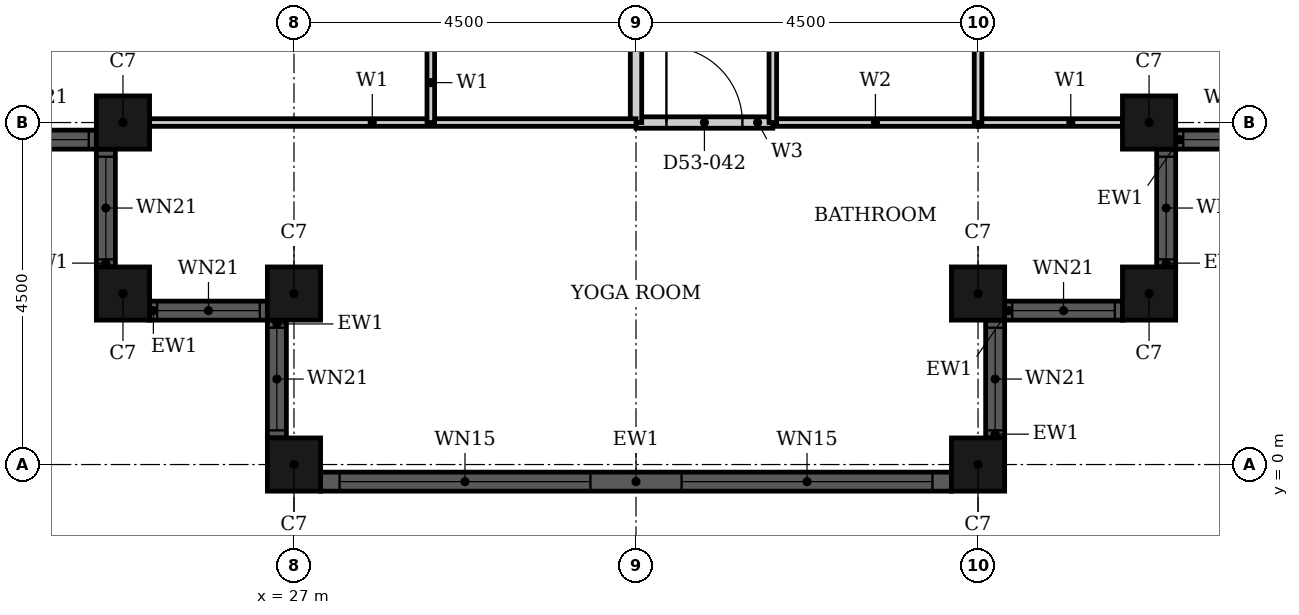
"""IFC4 building model, lengths in metres.
Left out: names, types, materials, properties, quantities, classifications, styles, units other than length and angle.
Written with IfcOpenShell. Run it as: python <this file> out.ifc"""

import sys

from ifc_helpers import new_model, si_unit, direction, frame, frame_2d, origin, origin_2d, place, context, subcontext, project, spatial, rectangle, hollow_rectangle, extrude, element, fill, save


model = new_model("IFC4")
c1 = context("Model", 3, precision=1e-05, world=origin(), true_north=direction((0.0, 1.0)))
c2 = subcontext(c1, "Body", "Model", "MODEL_VIEW")
j1 = project(units=[si_unit("LENGTHUNIT", "METRE"), si_unit("PLANEANGLEUNIT", "RADIAN")], contexts=[c1])
p1 = place(None, origin())
s1 = spatial("IfcSite", under=j1, at=p1, CompositionType="ELEMENT")
p2 = place(p1, origin())
s2 = spatial("IfcBuilding", under=s1, at=p2, CompositionType="ELEMENT")
p3 = place(p2, frame((0.0, 0.0, 210.9)))
s3 = spatial("IfcBuildingStorey", under=s2, at=p3, CompositionType="ELEMENT", Elevation=210.9)
for number, where, z_axis, x_axis in (
    (1, (24.75, 4.5, 0.0), (0.0, 0.0, 1.0), (1.0, 0.0, 0.0)),
    (2, (24.75, 2.25, 0.0), (0.0, 0.0, 1.0), (1.0, 0.0, 0.0)),
    (3, (27.0, 2.25, 0.0), (0.0, 0.0, 1.0), (1.0, 0.0, 0.0)),
    (4, (27.0, 0.0, 0.0), (0.0, 0.0, 1.0), (1.0, 0.0, 0.0)),
    (5, (36.0, 0.0, 0.0), (0.0, 0.0, 1.0), (1.0, 0.0, 0.0)),
    (6, (36.0, 2.25, 0.0), (0.0, 0.0, 1.0), (1.0, 0.0, 0.0)),
    (7, (38.25, 2.25, 0.0), (0.0, 0.0, 1.0), (1.0, 0.0, 0.0)),
    (8, (38.25, 4.5, 0.0), (0.0, 0.0, 1.0), (1.0, 0.0, 0.0)),
):
    element("IfcColumn", number, at=place(p3, frame(where, z_axis=z_axis, x_axis=x_axis)), inside=s3, PredefinedType="COLUMN", context=c2, shape_type="SweptSolid", body=[
        extrude(hollow_rectangle(XDim=0.7, YDim=0.7, WallThickness=0.022, at=origin_2d()), origin(), (0.0, 0.0, 1.0), 3.7),
    ])
p4 = place(p3, frame((22.85, 4.275, 0.0), z_axis=(0.0, 0.0, 1.0), x_axis=(1.0, 0.0, 0.0)))
e9 = element("IfcWall", 9, at=p4, inside=s3, PredefinedType="SOLIDWALL", context=c2, shape_type="SweptSolid", body=[
    extrude(rectangle(XDim=1.55, YDim=0.25, at=frame_2d((0.775, 0.0))), origin(), (0.0, 0.0, 1.0), 3.7),
])
p5 = place(p4, frame((0.1, 0.0, 0.9)))
e10 = element("IfcOpeningElement", 10, at=p5, cuts=e9, PredefinedType="OPENING", context=c2, shape_type="SweptSolid", body=[
    extrude(rectangle(XDim=1.35, YDim=1.85, at=frame_2d((0.675, 0.925))), frame((0.0, 0.135, 0.0), z_axis=(0.0, -1.0, 0.0), x_axis=(1.0, 0.0, 0.0)), (0.0, 0.0, 1.0), 0.27),
])
p6 = place(p3, frame((24.525, 4.15, 0.0), z_axis=(0.0, 0.0, 1.0), x_axis=(0.0, -1.0, 0.0)))
e11 = element("IfcWall", 11, at=p6, inside=s3, PredefinedType="SOLIDWALL", context=c2, shape_type="SweptSolid", body=[
    extrude(rectangle(XDim=1.55, YDim=0.25, at=frame_2d((0.775, 0.0))), origin(), (0.0, 0.0, 1.0), 3.7),
])
p7 = place(p6, frame((0.1, 0.0, 0.9)))
e12 = element("IfcOpeningElement", 12, at=p7, cuts=e11, PredefinedType="OPENING", context=c2, shape_type="SweptSolid", body=[
    extrude(rectangle(XDim=1.35, YDim=1.85, at=frame_2d((0.675, 0.925))), frame((0.0, 0.135, 0.0), z_axis=(0.0, -1.0, 0.0), x_axis=(1.0, 0.0, 0.0)), (0.0, 0.0, 1.0), 0.27),
])
p8 = place(p3, frame((25.1, 2.025, 0.0), z_axis=(0.0, 0.0, 1.0), x_axis=(1.0, 0.0, 0.0)))
e13 = element("IfcWall", 13, at=p8, inside=s3, PredefinedType="SOLIDWALL", context=c2, shape_type="SweptSolid", body=[
    extrude(rectangle(XDim=1.55, YDim=0.25, at=frame_2d((0.775, 0.0))), origin(), (0.0, 0.0, 1.0), 3.7),
])
p9 = place(p8, frame((0.1, 0.0, 0.9)))
e14 = element("IfcOpeningElement", 14, at=p9, cuts=e13, PredefinedType="OPENING", context=c2, shape_type="SweptSolid", body=[
    extrude(rectangle(XDim=1.35, YDim=1.85, at=frame_2d((0.675, 0.925))), frame((0.0, 0.135, 0.0), z_axis=(0.0, -1.0, 0.0), x_axis=(1.0, 0.0, 0.0)), (0.0, 0.0, 1.0), 0.27),
])
p10 = place(p3, frame((26.775, 1.9, 0.0), z_axis=(0.0, 0.0, 1.0), x_axis=(0.0, -1.0, 0.0)))
e15 = element("IfcWall", 15, at=p10, inside=s3, PredefinedType="SOLIDWALL", context=c2, shape_type="SweptSolid", body=[
    extrude(rectangle(XDim=1.55, YDim=0.25, at=frame_2d((0.775, 0.0))), origin(), (0.0, 0.0, 1.0), 3.7),
])
p11 = place(p10, frame((0.1, 0.0, 0.9)))
e16 = element("IfcOpeningElement", 16, at=p11, cuts=e15, PredefinedType="OPENING", context=c2, shape_type="SweptSolid", body=[
    extrude(rectangle(XDim=1.35, YDim=1.85, at=frame_2d((0.675, 0.925))), frame((0.0, 0.135, 0.0), z_axis=(0.0, -1.0, 0.0), x_axis=(1.0, 0.0, 0.0)), (0.0, 0.0, 1.0), 0.27),
])
p12 = place(p3, frame((27.35, -0.225, 0.0), z_axis=(0.0, 0.0, 1.0), x_axis=(1.0, 0.0, 0.0)))
e17 = element("IfcWall", 17, at=p12, inside=s3, PredefinedType="SOLIDWALL", context=c2, shape_type="SweptSolid", body=[
    extrude(rectangle(XDim=8.3, YDim=0.25, at=frame_2d((4.15, 0.0))), origin(), (0.0, 0.0, 1.0), 3.7),
])
p13 = place(p12, frame((0.25, 0.0, 0.45)))
e18 = element("IfcOpeningElement", 18, at=p13, cuts=e17, PredefinedType="OPENING", context=c2, shape_type="SweptSolid", body=[
    extrude(rectangle(XDim=3.3, YDim=2.3, at=frame_2d((1.65, 1.15))), frame((0.0, 0.135, 0.0), z_axis=(0.0, -1.0, 0.0), x_axis=(1.0, 0.0, 0.0)), (0.0, 0.0, 1.0), 0.27),
])
p14 = place(p12, frame((4.75, 0.0, 0.45)))
e19 = element("IfcOpeningElement", 19, at=p14, cuts=e17, PredefinedType="OPENING", context=c2, shape_type="SweptSolid", body=[
    extrude(rectangle(XDim=3.3, YDim=2.3, at=frame_2d((1.65, 1.15))), frame((0.0, 0.135, 0.0), z_axis=(0.0, -1.0, 0.0), x_axis=(1.0, 0.0, 0.0)), (0.0, 0.0, 1.0), 0.27),
])
p15 = place(p3, frame((36.225, 0.35, 0.0), z_axis=(0.0, 0.0, 1.0), x_axis=(0.0, 1.0, 0.0)))
e20 = element("IfcWall", 20, at=p15, inside=s3, PredefinedType="SOLIDWALL", context=c2, shape_type="SweptSolid", body=[
    extrude(rectangle(XDim=1.55, YDim=0.25, at=frame_2d((0.775, 0.0))), origin(), (0.0, 0.0, 1.0), 3.7),
])
p16 = place(p15, frame((0.1, 0.0, 0.9)))
e21 = element("IfcOpeningElement", 21, at=p16, cuts=e20, PredefinedType="OPENING", context=c2, shape_type="SweptSolid", body=[
    extrude(rectangle(XDim=1.35, YDim=1.85, at=frame_2d((0.675, 0.925))), frame((0.0, 0.135, 0.0), z_axis=(0.0, -1.0, 0.0), x_axis=(1.0, 0.0, 0.0)), (0.0, 0.0, 1.0), 0.27),
])
p17 = place(p3, frame((36.35, 2.025, 0.0), z_axis=(0.0, 0.0, 1.0), x_axis=(1.0, 0.0, 0.0)))
e22 = element("IfcWall", 22, at=p17, inside=s3, PredefinedType="SOLIDWALL", context=c2, shape_type="SweptSolid", body=[
    extrude(rectangle(XDim=1.55, YDim=0.25, at=frame_2d((0.775, 0.0))), origin(), (0.0, 0.0, 1.0), 3.7),
])
p18 = place(p17, frame((0.1, 0.0, 0.9)))
e23 = element("IfcOpeningElement", 23, at=p18, cuts=e22, PredefinedType="OPENING", context=c2, shape_type="SweptSolid", body=[
    extrude(rectangle(XDim=1.35, YDim=1.85, at=frame_2d((0.675, 0.925))), frame((0.0, 0.135, 0.0), z_axis=(0.0, -1.0, 0.0), x_axis=(1.0, 0.0, 0.0)), (0.0, 0.0, 1.0), 0.27),
])
p19 = place(p3, frame((38.475, 2.6, 0.0), z_axis=(0.0, 0.0, 1.0), x_axis=(0.0, 1.0, 0.0)))
e24 = element("IfcWall", 24, at=p19, inside=s3, PredefinedType="SOLIDWALL", context=c2, shape_type="SweptSolid", body=[
    extrude(rectangle(XDim=1.55, YDim=0.25, at=frame_2d((0.775, 0.0))), origin(), (0.0, 0.0, 1.0), 3.7),
])
p20 = place(p19, frame((0.1, 0.0, 0.9)))
e25 = element("IfcOpeningElement", 25, at=p20, cuts=e24, PredefinedType="OPENING", context=c2, shape_type="SweptSolid", body=[
    extrude(rectangle(XDim=1.35, YDim=1.85, at=frame_2d((0.675, 0.925))), frame((0.0, 0.135, 0.0), z_axis=(0.0, -1.0, 0.0), x_axis=(1.0, 0.0, 0.0)), (0.0, 0.0, 1.0), 0.27),
])
p21 = place(p3, frame((38.6, 4.275, 0.0), z_axis=(0.0, 0.0, 1.0), x_axis=(1.0, 0.0, 0.0)))
e26 = element("IfcWall", 26, at=p21, inside=s3, PredefinedType="SOLIDWALL", context=c2, shape_type="SweptSolid", body=[
    extrude(rectangle(XDim=1.55, YDim=0.25, at=frame_2d((0.775, 0.0))), origin(), (0.0, 0.0, 1.0), 3.7),
])
p22 = place(p21, frame((0.1, 0.0, 0.9)))
e27 = element("IfcOpeningElement", 27, at=p22, cuts=e26, PredefinedType="OPENING", context=c2, shape_type="SweptSolid", body=[
    extrude(rectangle(XDim=1.35, YDim=1.85, at=frame_2d((0.675, 0.925))), frame((0.0, 0.135, 0.0), z_axis=(0.0, -1.0, 0.0), x_axis=(1.0, 0.0, 0.0)), (0.0, 0.0, 1.0), 0.27),
])
p23 = place(p3, frame((31.5, 4.5, 0.0), z_axis=(0.0, 0.0, 1.0), x_axis=(1.0, 0.0, 0.0)))
e28 = element("IfcWall", 28, at=p23, inside=s3, PredefinedType="PARTITIONING", context=c2, shape_type="SweptSolid", body=[
    extrude(rectangle(XDim=1.8, YDim=0.15, at=frame_2d((0.9, 0.0))), origin(), (0.0, 0.0, 1.0), 3.4),
])
p24 = place(p23, frame((0.4, 0.0, 0.0)))
e29 = element("IfcOpeningElement", 29, at=p24, cuts=e28, PredefinedType="OPENING", context=c2, shape_type="SweptSolid", body=[
    extrude(rectangle(XDim=1.0, YDim=2.1, at=frame_2d((0.5, 1.05))), frame((0.0, 0.085, 0.0), z_axis=(0.0, -1.0, 0.0), x_axis=(1.0, 0.0, 0.0)), (0.0, 0.0, 1.0), 0.17),
])
p25 = place(p3, frame((31.5, 4.5, 0.0), z_axis=(0.0, 0.0, 1.0), x_axis=(0.0, 1.0, 0.0)))
e30 = element("IfcWall", 30, at=p25, inside=s3, PredefinedType="PARTITIONING", context=c2, shape_type="SweptSolid", body=[
    extrude(rectangle(XDim=6.6, YDim=0.15, at=frame_2d((3.3, 0.0))), origin(), (0.0, 0.0, 1.0), 2.68),
])
p26 = place(p25, frame((4.3, 0.0, 0.0)))
e31 = element("IfcOpeningElement", 31, at=p26, cuts=e30, PredefinedType="OPENING", context=c2, shape_type="SweptSolid", body=[
    extrude(rectangle(XDim=1.0, YDim=2.2, at=frame_2d((0.5, 1.1))), frame((0.0, 0.085, 0.0), z_axis=(0.0, -1.0, 0.0), x_axis=(1.0, 0.0, 0.0)), (0.0, 0.0, 1.0), 0.17),
])
p27 = place(p3, frame((36.0, 4.5, 0.0), z_axis=(0.0, 0.0, 1.0), x_axis=(1.0, 0.0, 0.0)))
e32 = element("IfcWall", 32, at=p27, inside=s3, PredefinedType="PARTITIONING", context=c2, shape_type="SweptSolid", body=[
    extrude(rectangle(XDim=2.44, YDim=0.1, at=frame_2d((1.22, 0.0))), origin(), (0.0, 0.0, 1.0), 3.4),
])
p28 = place(p3, frame((24.56, 4.5, 0.0), z_axis=(0.0, 0.0, 1.0), x_axis=(1.0, 0.0, 0.0)))
e33 = element("IfcWall", 33, at=p28, inside=s3, PredefinedType="PARTITIONING", context=c2, shape_type="SweptSolid", body=[
    extrude(rectangle(XDim=6.94, YDim=0.1, at=frame_2d((3.47, 0.0))), origin(), (0.0, 0.0, 1.0), 3.4),
])
p29 = place(p3, frame((28.8, 4.5, 0.0), z_axis=(0.0, 0.0, 1.0), x_axis=(0.0, 1.0, 0.0)))
e34 = element("IfcWall", 34, at=p29, inside=s3, PredefinedType="PARTITIONING", context=c2, shape_type="SweptSolid", body=[
    extrude(rectangle(XDim=3.0, YDim=0.1, at=frame_2d((1.5, 0.0))), origin(), (0.0, 0.0, 1.0), 3.4),
])
p30 = place(p29, frame((1.05, 0.0, 0.0)))
e35 = element("IfcOpeningElement", 35, at=p30, cuts=e34, PredefinedType="OPENING", context=c2, shape_type="SweptSolid", body=[
    extrude(rectangle(XDim=0.9, YDim=2.1, at=frame_2d((0.45, 1.05))), frame((0.0, 0.06, 0.0), z_axis=(0.0, -1.0, 0.0), x_axis=(1.0, 0.0, 0.0)), (0.0, 0.0, 1.0), 0.12),
])
p31 = place(p3, frame((33.3, 4.5, 0.0), z_axis=(0.0, 0.0, 1.0), x_axis=(1.0, 0.0, 0.0)))
e36 = element("IfcWall", 36, at=p31, inside=s3, PredefinedType="PARTITIONING", context=c2, shape_type="SweptSolid", body=[
    extrude(rectangle(XDim=2.7, YDim=0.1, at=frame_2d((1.35, 0.0))), origin(), (0.0, 0.0, 1.0), 3.4),
])
p32 = place(p3, frame((33.3, 4.5, 0.0), z_axis=(0.0, 0.0, 1.0), x_axis=(0.0, 1.0, 0.0)))
e37 = element("IfcWall", 37, at=p32, inside=s3, PredefinedType="PARTITIONING", context=c2, shape_type="SweptSolid", body=[
    extrude(rectangle(XDim=2.4, YDim=0.1, at=frame_2d((1.2, 0.0))), origin(), (0.0, 0.0, 1.0), 3.4),
])
p33 = place(p3, frame((36.0, 4.5, 0.0), z_axis=(0.0, 0.0, 1.0), x_axis=(0.0, 1.0, 0.0)))
e38 = element("IfcWall", 38, at=p33, inside=s3, PredefinedType="PARTITIONING", context=c2, shape_type="SweptSolid", body=[
    extrude(rectangle(XDim=2.4, YDim=0.1, at=frame_2d((1.2, 0.0))), origin(), (0.0, 0.0, 1.0), 2.68),
])
p34 = place(p5, origin())
e39 = element("IfcWindow", 39, at=p34, inside=s3, PartitioningType="SINGLE_PANEL", PredefinedType="WINDOW", context=c2, shape_type="SweptSolid", body=[
    extrude(rectangle(XDim=1.35, YDim=1.85, at=frame_2d((0.675, 0.925))), frame((0.0, 0.03, 0.0), z_axis=(0.0, -1.0, 0.0), x_axis=(1.0, 0.0, 0.0)), (0.0, 0.0, 1.0), 0.06),
])
fill(e10, e39)
p35 = place(p7, origin())
e40 = element("IfcWindow", 40, at=p35, inside=s3, PartitioningType="SINGLE_PANEL", PredefinedType="WINDOW", context=c2, shape_type="SweptSolid", body=[
    extrude(rectangle(XDim=1.35, YDim=1.85, at=frame_2d((0.675, 0.925))), frame((0.0, 0.03, 0.0), z_axis=(0.0, -1.0, 0.0), x_axis=(1.0, 0.0, 0.0)), (0.0, 0.0, 1.0), 0.06),
])
fill(e12, e40)
p36 = place(p9, origin())
e41 = element("IfcWindow", 41, at=p36, inside=s3, PartitioningType="SINGLE_PANEL", PredefinedType="WINDOW", context=c2, shape_type="SweptSolid", body=[
    extrude(rectangle(XDim=1.35, YDim=1.85, at=frame_2d((0.675, 0.925))), frame((0.0, 0.03, 0.0), z_axis=(0.0, -1.0, 0.0), x_axis=(1.0, 0.0, 0.0)), (0.0, 0.0, 1.0), 0.06),
])
fill(e14, e41)
p37 = place(p11, origin())
e42 = element("IfcWindow", 42, at=p37, inside=s3, PartitioningType="SINGLE_PANEL", PredefinedType="WINDOW", context=c2, shape_type="SweptSolid", body=[
    extrude(rectangle(XDim=1.35, YDim=1.85, at=frame_2d((0.675, 0.925))), frame((0.0, 0.03, 0.0), z_axis=(0.0, -1.0, 0.0), x_axis=(1.0, 0.0, 0.0)), (0.0, 0.0, 1.0), 0.06),
])
fill(e16, e42)
p38 = place(p13, origin())
e43 = element("IfcWindow", 43, at=p38, inside=s3, PartitioningType="SINGLE_PANEL", PredefinedType="WINDOW", context=c2, shape_type="SweptSolid", body=[
    extrude(rectangle(XDim=3.3, YDim=2.3, at=frame_2d((1.65, 1.15))), frame((0.0, 0.03, 0.0), z_axis=(0.0, -1.0, 0.0), x_axis=(1.0, 0.0, 0.0)), (0.0, 0.0, 1.0), 0.06),
])
fill(e18, e43)
p39 = place(p14, origin())
e44 = element("IfcWindow", 44, at=p39, inside=s3, PartitioningType="SINGLE_PANEL", PredefinedType="WINDOW", context=c2, shape_type="SweptSolid", body=[
    extrude(rectangle(XDim=3.3, YDim=2.3, at=frame_2d((1.65, 1.15))), frame((0.0, 0.03, 0.0), z_axis=(0.0, -1.0, 0.0), x_axis=(1.0, 0.0, 0.0)), (0.0, 0.0, 1.0), 0.06),
])
fill(e19, e44)
p40 = place(p16, origin())
e45 = element("IfcWindow", 45, at=p40, inside=s3, PartitioningType="SINGLE_PANEL", PredefinedType="WINDOW", context=c2, shape_type="SweptSolid", body=[
    extrude(rectangle(XDim=1.35, YDim=1.85, at=frame_2d((0.675, 0.925))), frame((0.0, 0.03, 0.0), z_axis=(0.0, -1.0, 0.0), x_axis=(1.0, 0.0, 0.0)), (0.0, 0.0, 1.0), 0.06),
])
fill(e21, e45)
p41 = place(p18, origin())
e46 = element("IfcWindow", 46, at=p41, inside=s3, PartitioningType="SINGLE_PANEL", PredefinedType="WINDOW", context=c2, shape_type="SweptSolid", body=[
    extrude(rectangle(XDim=1.35, YDim=1.85, at=frame_2d((0.675, 0.925))), frame((0.0, 0.03, 0.0), z_axis=(0.0, -1.0, 0.0), x_axis=(1.0, 0.0, 0.0)), (0.0, 0.0, 1.0), 0.06),
])
fill(e23, e46)
p42 = place(p20, origin())
e47 = element("IfcWindow", 47, at=p42, inside=s3, PartitioningType="SINGLE_PANEL", PredefinedType="WINDOW", context=c2, shape_type="SweptSolid", body=[
    extrude(rectangle(XDim=1.35, YDim=1.85, at=frame_2d((0.675, 0.925))), frame((0.0, 0.03, 0.0), z_axis=(0.0, -1.0, 0.0), x_axis=(1.0, 0.0, 0.0)), (0.0, 0.0, 1.0), 0.06),
])
fill(e25, e47)
p43 = place(p22, origin())
e48 = element("IfcWindow", 48, at=p43, inside=s3, PartitioningType="SINGLE_PANEL", PredefinedType="WINDOW", context=c2, shape_type="SweptSolid", body=[
    extrude(rectangle(XDim=1.35, YDim=1.85, at=frame_2d((0.675, 0.925))), frame((0.0, 0.03, 0.0), z_axis=(0.0, -1.0, 0.0), x_axis=(1.0, 0.0, 0.0)), (0.0, 0.0, 1.0), 0.06),
])
fill(e27, e48)
p44 = place(p24, origin())
e49 = element("IfcDoor", 49, at=p44, inside=s3, OperationType="SINGLE_SWING_LEFT", PredefinedType="DOOR", context=c2, shape_type="SweptSolid", body=[
    extrude(rectangle(XDim=1.0, YDim=2.1, at=frame_2d((0.5, 1.05))), frame((0.0, 0.025, 0.0), z_axis=(0.0, -1.0, 0.0), x_axis=(1.0, 0.0, 0.0)), (0.0, 0.0, 1.0), 0.05),
])
fill(e29, e49)
save(model, sys.argv[1])
